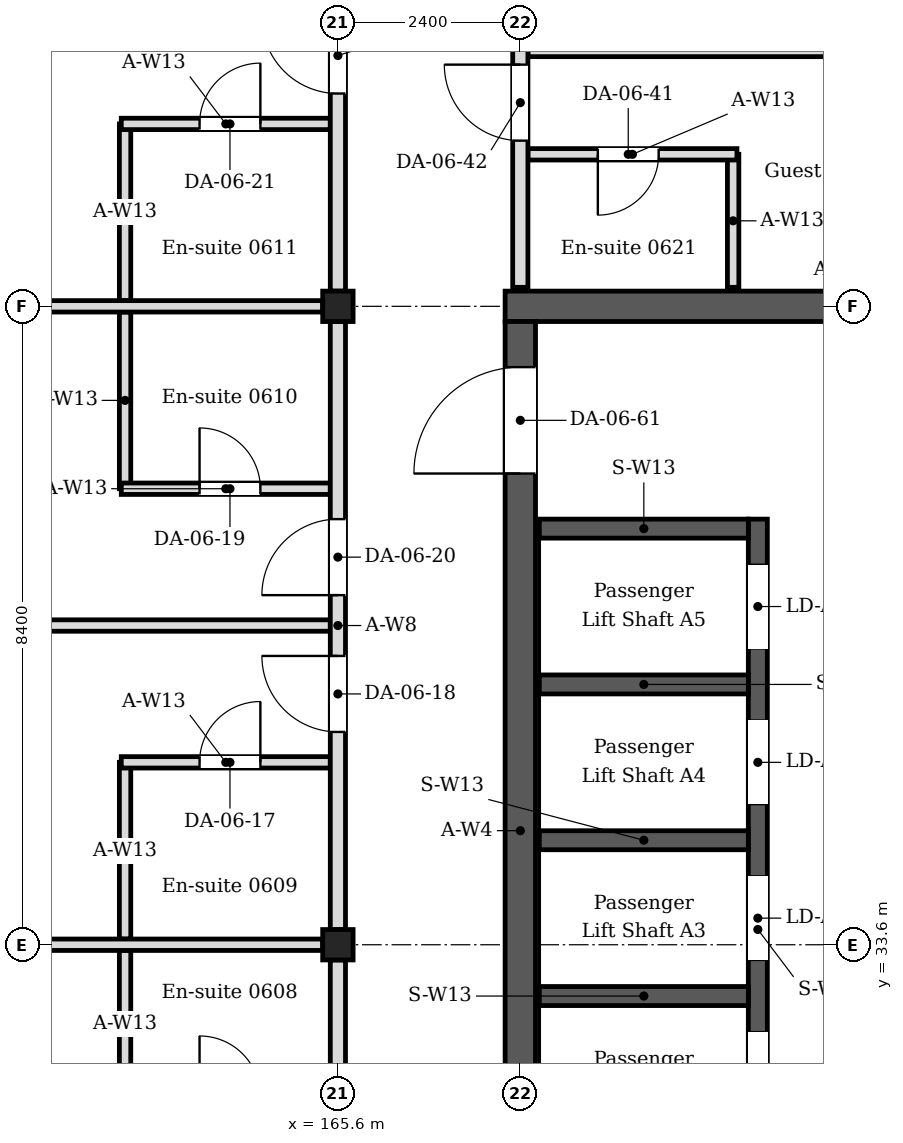
"""IFC4 building model, lengths in metres.
Left out: names, types, materials, properties, quantities, classifications, styles, units other than length and angle.
Written with IfcOpenShell. Run it as: python <this file> out.ifc"""

import sys

from ifc_helpers import new_model, si_unit, direction, frame, frame_2d, origin, origin_2d, place, context, subcontext, project, spatial, rectangle, i_section, extrude, element, fill, save


model = new_model("IFC4")
c1 = context("Model", 3, precision=1e-05, world=origin(), true_north=direction((0.0, 1.0)))
c2 = subcontext(c1, "Body", "Model", "MODEL_VIEW")
j1 = project(units=[si_unit("LENGTHUNIT", "METRE"), si_unit("PLANEANGLEUNIT", "RADIAN")], contexts=[c1])
p1 = place(None, origin())
s1 = spatial("IfcSite", under=j1, at=p1, CompositionType="ELEMENT")
p2 = place(p1, origin())
s2 = spatial("IfcBuilding", under=s1, at=p2, CompositionType="ELEMENT")
p3 = place(p2, frame((0.0, 0.0, 27.0)))
s3 = spatial("IfcBuildingStorey", under=s2, at=p3, CompositionType="ELEMENT", Elevation=27.0)
for number, where, z_axis, x_axis in (
    (1, (165.6, 33.6, 0.0), (0.0, 0.0, 1.0), (1.0, 0.0, 0.0)),
    (2, (165.6, 42.0, 0.0), (0.0, 0.0, 1.0), (1.0, 0.0, 0.0)),
):
    element("IfcColumn", number, at=place(p3, frame(where, z_axis=z_axis, x_axis=x_axis)), inside=s3, PredefinedType="COLUMN", context=c2, shape_type="SweptSolid", body=[
        extrude(i_section(OverallWidth=0.4, OverallDepth=0.4, WebThickness=0.013, FlangeThickness=0.021, FilletRadius=0.022, at=origin_2d()), origin(), (0.0, 0.0, 1.0), 4.2),
    ])
p4 = place(p3, frame((167.8, 42.0, 0.0), z_axis=(0.0, 0.0, 1.0), x_axis=(1.0, 0.0, 0.0)))
e3 = element("IfcWall", 3, at=p4, inside=s3, PredefinedType="SOLIDWALL", context=c2, shape_type="SweptSolid", body=[
    extrude(rectangle(XDim=8.8, YDim=0.4, at=frame_2d((4.4, 0.0))), origin(), (0.0, 0.0, 1.0), 4.05),
])
p5 = place(p3, frame((168.0, 25.4, 0.0), z_axis=(0.0, 0.0, 1.0), x_axis=(0.0, 1.0, 0.0)))
e4 = element("IfcWall", 4, at=p5, inside=s3, PredefinedType="SOLIDWALL", context=c2, shape_type="SweptSolid", body=[
    extrude(rectangle(XDim=16.4, YDim=0.4, at=frame_2d((8.2, 0.0))), origin(), (0.0, 0.0, 1.0), 4.05),
])
p6 = place(p5, frame((1.0, 0.0, 0.0)))
e5 = element("IfcOpeningElement", 5, at=p6, cuts=e4, PredefinedType="OPENING", context=c2, shape_type="SweptSolid", body=[
    extrude(rectangle(XDim=1.0, YDim=2.1, at=frame_2d((0.5, 1.05))), frame((0.0, 0.21, 0.0), z_axis=(0.0, -1.0, 0.0), x_axis=(1.0, 0.0, 0.0)), (0.0, 0.0, 1.0), 0.42),
])
p7 = place(p5, frame((14.4, 0.0, 0.0)))
e6 = element("IfcOpeningElement", 6, at=p7, cuts=e4, PredefinedType="OPENING", context=c2, shape_type="SweptSolid", body=[
    extrude(rectangle(XDim=1.4, YDim=2.1, at=frame_2d((0.7, 1.05))), frame((0.0, 0.21, 0.0), z_axis=(0.0, -1.0, 0.0), x_axis=(1.0, 0.0, 0.0)), (0.0, 0.0, 1.0), 0.42),
])
p8 = place(p3, frame((162.8, 31.6, 0.0), z_axis=(0.0, 0.0, 1.0), x_axis=(0.0, 1.0, 0.0)))
e7 = element("IfcWall", 7, at=p8, inside=s3, PredefinedType="PARTITIONING", context=c2, shape_type="SweptSolid", body=[
    extrude(rectangle(XDim=1.925, YDim=0.15, at=frame_2d((0.962, 0.0))), origin(), (0.0, 0.0, 1.0), 4.05),
])
p9 = place(p3, frame((162.8, 33.675, 0.0), z_axis=(0.0, 0.0, 1.0), x_axis=(0.0, 1.0, 0.0)))
e8 = element("IfcWall", 8, at=p9, inside=s3, PredefinedType="PARTITIONING", context=c2, shape_type="SweptSolid", body=[
    extrude(rectangle(XDim=2.325, YDim=0.15, at=frame_2d((1.163, 0.0))), origin(), (0.0, 0.0, 1.0), 4.05),
])
p10 = place(p3, frame((162.75, 36.0, 0.0), z_axis=(0.0, 0.0, 1.0), x_axis=(1.0, 0.0, 0.0)))
e9 = element("IfcWall", 9, at=p10, inside=s3, PredefinedType="PARTITIONING", context=c2, shape_type="SweptSolid", body=[
    extrude(rectangle(XDim=2.75, YDim=0.15, at=frame_2d((1.375, 0.0))), origin(), (0.0, 0.0, 1.0), 4.05),
])
p11 = place(p10, frame((1.03, 0.0, 0.0)))
e10 = element("IfcOpeningElement", 10, at=p11, cuts=e9, PredefinedType="OPENING", context=c2, shape_type="SweptSolid", body=[
    extrude(rectangle(XDim=0.8, YDim=2.1, at=frame_2d((0.4, 1.05))), frame((0.0, 0.085, 0.0), z_axis=(0.0, -1.0, 0.0), x_axis=(1.0, 0.0, 0.0)), (0.0, 0.0, 1.0), 0.17),
])
p12 = place(p3, frame((162.8, 39.6, 0.0), z_axis=(0.0, 0.0, 1.0), x_axis=(0.0, 1.0, 0.0)))
e11 = element("IfcWall", 11, at=p12, inside=s3, PredefinedType="PARTITIONING", context=c2, shape_type="SweptSolid", body=[
    extrude(rectangle(XDim=2.325, YDim=0.15, at=frame_2d((1.163, 0.0))), origin(), (0.0, 0.0, 1.0), 4.05),
])
p13 = place(p3, frame((162.75, 39.6, 0.0), z_axis=(0.0, 0.0, 1.0), x_axis=(1.0, 0.0, 0.0)))
e12 = element("IfcWall", 12, at=p13, inside=s3, PredefinedType="PARTITIONING", context=c2, shape_type="SweptSolid", body=[
    extrude(rectangle(XDim=2.75, YDim=0.15, at=frame_2d((1.375, 0.0))), origin(), (0.0, 0.0, 1.0), 4.05),
])
p14 = place(p13, frame((1.03, 0.0, 0.0)))
e13 = element("IfcOpeningElement", 13, at=p14, cuts=e12, PredefinedType="OPENING", context=c2, shape_type="SweptSolid", body=[
    extrude(rectangle(XDim=0.8, YDim=2.1, at=frame_2d((0.4, 1.05))), frame((0.0, 0.085, 0.0), z_axis=(0.0, -1.0, 0.0), x_axis=(1.0, 0.0, 0.0)), (0.0, 0.0, 1.0), 0.17),
])
p15 = place(p3, frame((162.8, 42.075, 0.0), z_axis=(0.0, 0.0, 1.0), x_axis=(0.0, 1.0, 0.0)))
e14 = element("IfcWall", 14, at=p15, inside=s3, PredefinedType="PARTITIONING", context=c2, shape_type="SweptSolid", body=[
    extrude(rectangle(XDim=2.325, YDim=0.15, at=frame_2d((1.163, 0.0))), origin(), (0.0, 0.0, 1.0), 4.05),
])
p16 = place(p3, frame((162.75, 44.4, 0.0), z_axis=(0.0, 0.0, 1.0), x_axis=(1.0, 0.0, 0.0)))
e15 = element("IfcWall", 15, at=p16, inside=s3, PredefinedType="PARTITIONING", context=c2, shape_type="SweptSolid", body=[
    extrude(rectangle(XDim=2.75, YDim=0.15, at=frame_2d((1.375, 0.0))), origin(), (0.0, 0.0, 1.0), 4.05),
])
p17 = place(p16, frame((1.03, 0.0, 0.0)))
e16 = element("IfcOpeningElement", 16, at=p17, cuts=e15, PredefinedType="OPENING", context=c2, shape_type="SweptSolid", body=[
    extrude(rectangle(XDim=0.8, YDim=2.1, at=frame_2d((0.4, 1.05))), frame((0.0, 0.085, 0.0), z_axis=(0.0, -1.0, 0.0), x_axis=(1.0, 0.0, 0.0)), (0.0, 0.0, 1.0), 0.17),
])
p18 = place(p3, frame((170.8, 42.25, 0.0), z_axis=(0.0, 0.0, 1.0), x_axis=(0.0, 1.0, 0.0)))
e17 = element("IfcWall", 17, at=p18, inside=s3, PredefinedType="PARTITIONING", context=c2, shape_type="SweptSolid", body=[
    extrude(rectangle(XDim=1.75, YDim=0.15, at=frame_2d((0.875, 0.0))), origin(), (0.0, 0.0, 1.0), 4.05),
])
p19 = place(p3, frame((170.85, 44.0, 0.0), z_axis=(0.0, 0.0, 1.0), x_axis=(-1.0, 0.0, 0.0)))
e18 = element("IfcWall", 18, at=p19, inside=s3, PredefinedType="PARTITIONING", context=c2, shape_type="SweptSolid", body=[
    extrude(rectangle(XDim=2.75, YDim=0.15, at=frame_2d((1.375, 0.0))), origin(), (0.0, 0.0, 1.0), 4.05),
])
p20 = place(p19, frame((1.03, 0.0, 0.0)))
e19 = element("IfcOpeningElement", 19, at=p20, cuts=e18, PredefinedType="OPENING", context=c2, shape_type="SweptSolid", body=[
    extrude(rectangle(XDim=0.8, YDim=2.1, at=frame_2d((0.4, 1.05))), frame((0.0, 0.085, 0.0), z_axis=(0.0, -1.0, 0.0), x_axis=(1.0, 0.0, 0.0)), (0.0, 0.0, 1.0), 0.17),
])
for number, where, z_axis, x_axis in (
    (20, (157.4, 33.6, 0.0), (0.0, 0.0, 1.0), (1.0, 0.0, 0.0)),
    (21, (157.4, 42.0, 0.0), (0.0, 0.0, 1.0), (1.0, 0.0, 0.0)),
):
    element("IfcWall", number, at=place(p3, frame(where, z_axis=z_axis, x_axis=x_axis)), inside=s3, PredefinedType="PARTITIONING", context=c2, shape_type="SweptSolid", body=[
        extrude(rectangle(XDim=8.0, YDim=0.15, at=frame_2d((4.0, 0.0))), origin(), (0.0, 0.0, 1.0), 3.604),
    ])
for number, where, z_axis, x_axis in (
    (22, (156.98, 37.8, 0.0), (0.0, 0.0, 1.0), (1.0, 0.0, 0.0)),
    (23, (168.1, 45.36, 0.0), (0.0, 0.0, 1.0), (1.0, 0.0, 0.0)),
):
    element("IfcWall", number, at=place(p3, frame(where, z_axis=z_axis, x_axis=x_axis)), inside=s3, PredefinedType="PARTITIONING", context=c2, shape_type="SweptSolid", body=[
        extrude(rectangle(XDim=8.52, YDim=0.15, at=frame_2d((4.26, 0.0))), origin(), (0.0, 0.0, 1.0), 3.604),
    ])
p21 = place(p3, frame((165.6, 25.4, 0.0), z_axis=(0.0, 0.0, 1.0), x_axis=(0.0, 1.0, 0.0)))
e24 = element("IfcWall", 24, at=p21, inside=s3, PredefinedType="PARTITIONING", context=c2, shape_type="SweptSolid", body=[
    extrude(rectangle(XDim=8.0, YDim=0.2, at=frame_2d((4.0, 0.0))), origin(), (0.0, 0.0, 1.0), 3.45),
])
p22 = place(p21, frame((3.02, 0.0, 0.0)))
e25 = element("IfcOpeningElement", 25, at=p22, cuts=e24, PredefinedType="OPENING", context=c2, shape_type="SweptSolid", body=[
    extrude(rectangle(XDim=1.0, YDim=2.4, at=frame_2d((0.5, 1.2))), frame((0.0, 0.11, 0.0), z_axis=(0.0, -1.0, 0.0), x_axis=(1.0, 0.0, 0.0)), (0.0, 0.0, 1.0), 0.22),
])
p23 = place(p21, frame((5.02, 0.0, 0.0)))
e26 = element("IfcOpeningElement", 26, at=p23, cuts=e24, PredefinedType="OPENING", context=c2, shape_type="SweptSolid", body=[
    extrude(rectangle(XDim=1.0, YDim=2.4, at=frame_2d((0.5, 1.2))), frame((0.0, 0.11, 0.0), z_axis=(0.0, -1.0, 0.0), x_axis=(1.0, 0.0, 0.0)), (0.0, 0.0, 1.0), 0.22),
])
p24 = place(p3, frame((165.6, 33.8, 0.0), z_axis=(0.0, 0.0, 1.0), x_axis=(0.0, 1.0, 0.0)))
e27 = element("IfcWall", 27, at=p24, inside=s3, PredefinedType="PARTITIONING", context=c2, shape_type="SweptSolid", body=[
    extrude(rectangle(XDim=8.0, YDim=0.2, at=frame_2d((4.0, 0.0))), origin(), (0.0, 0.0, 1.0), 3.45),
])
p25 = place(p24, frame((2.6, 0.0, 0.0)))
e28 = element("IfcOpeningElement", 28, at=p25, cuts=e27, PredefinedType="OPENING", context=c2, shape_type="SweptSolid", body=[
    extrude(rectangle(XDim=1.0, YDim=2.4, at=frame_2d((0.5, 1.2))), frame((0.0, 0.11, 0.0), z_axis=(0.0, -1.0, 0.0), x_axis=(1.0, 0.0, 0.0)), (0.0, 0.0, 1.0), 0.22),
])
p26 = place(p24, frame((4.4, 0.0, 0.0)))
e29 = element("IfcOpeningElement", 29, at=p26, cuts=e27, PredefinedType="OPENING", context=c2, shape_type="SweptSolid", body=[
    extrude(rectangle(XDim=1.0, YDim=2.4, at=frame_2d((0.5, 1.2))), frame((0.0, 0.11, 0.0), z_axis=(0.0, -1.0, 0.0), x_axis=(1.0, 0.0, 0.0)), (0.0, 0.0, 1.0), 0.22),
])
p27 = place(p3, frame((165.6, 42.2, 0.0), z_axis=(0.0, 0.0, 1.0), x_axis=(0.0, 1.0, 0.0)))
e30 = element("IfcWall", 30, at=p27, inside=s3, PredefinedType="PARTITIONING", context=c2, shape_type="SweptSolid", body=[
    extrude(rectangle(XDim=8.0, YDim=0.2, at=frame_2d((4.0, 0.0))), origin(), (0.0, 0.0, 1.0), 3.45),
])
p28 = place(p27, frame((2.6, 0.0, 0.0)))
e31 = element("IfcOpeningElement", 31, at=p28, cuts=e30, PredefinedType="OPENING", context=c2, shape_type="SweptSolid", body=[
    extrude(rectangle(XDim=1.0, YDim=2.4, at=frame_2d((0.5, 1.2))), frame((0.0, 0.11, 0.0), z_axis=(0.0, -1.0, 0.0), x_axis=(1.0, 0.0, 0.0)), (0.0, 0.0, 1.0), 0.22),
])
p29 = place(p27, frame((4.4, 0.0, 0.0)))
e32 = element("IfcOpeningElement", 32, at=p29, cuts=e30, PredefinedType="OPENING", context=c2, shape_type="SweptSolid", body=[
    extrude(rectangle(XDim=1.0, YDim=2.4, at=frame_2d((0.5, 1.2))), frame((0.0, 0.11, 0.0), z_axis=(0.0, -1.0, 0.0), x_axis=(1.0, 0.0, 0.0)), (0.0, 0.0, 1.0), 0.22),
])
p30 = place(p3, frame((168.0, 42.25, 0.0), z_axis=(0.0, 0.0, 1.0), x_axis=(0.0, 1.0, 0.0)))
e33 = element("IfcWall", 33, at=p30, inside=s3, PredefinedType="PARTITIONING", context=c2, shape_type="SweptSolid", body=[
    extrude(rectangle(XDim=7.95, YDim=0.2, at=frame_2d((3.975, 0.0))), origin(), (0.0, 0.0, 1.0), 3.45),
])
p31 = place(p30, frame((1.93, 0.0, 0.0)))
e34 = element("IfcOpeningElement", 34, at=p31, cuts=e33, PredefinedType="OPENING", context=c2, shape_type="SweptSolid", body=[
    extrude(rectangle(XDim=1.0, YDim=2.4, at=frame_2d((0.5, 1.2))), frame((0.0, 0.11, 0.0), z_axis=(0.0, -1.0, 0.0), x_axis=(1.0, 0.0, 0.0)), (0.0, 0.0, 1.0), 0.22),
])
p32 = place(p30, frame((3.93, 0.0, 0.0)))
e35 = element("IfcOpeningElement", 35, at=p32, cuts=e33, PredefinedType="OPENING", context=c2, shape_type="SweptSolid", body=[
    extrude(rectangle(XDim=1.0, YDim=2.4, at=frame_2d((0.5, 1.2))), frame((0.0, 0.11, 0.0), z_axis=(0.0, -1.0, 0.0), x_axis=(1.0, 0.0, 0.0)), (0.0, 0.0, 1.0), 0.22),
])
p33 = place(p3, frame((171.125, 28.3, 0.0), z_axis=(0.0, 0.0, 1.0), x_axis=(0.0, 1.0, 0.0)))
e36 = element("IfcWall", 36, at=p33, inside=s3, PredefinedType="SOLIDWALL", context=c2, shape_type="SweptSolid", body=[
    extrude(rectangle(XDim=10.9, YDim=0.25, at=frame_2d((5.45, 0.0))), origin(), (0.0, 0.0, 1.0), 4.05),
])
p34 = place(p33, frame((0.8, 0.0, 0.0)))
e37 = element("IfcOpeningElement", 37, at=p34, cuts=e36, PredefinedType="OPENING", context=c2, shape_type="SweptSolid", body=[
    extrude(rectangle(XDim=1.1, YDim=2.1, at=frame_2d((0.55, 1.05))), frame((0.0, 0.135, 0.0), z_axis=(0.0, -1.0, 0.0), x_axis=(1.0, 0.0, 0.0)), (0.0, 0.0, 1.0), 0.27),
])
p35 = place(p33, frame((3.05, 0.0, 0.0)))
e38 = element("IfcOpeningElement", 38, at=p35, cuts=e36, PredefinedType="OPENING", context=c2, shape_type="SweptSolid", body=[
    extrude(rectangle(XDim=1.1, YDim=2.1, at=frame_2d((0.55, 1.05))), frame((0.0, 0.135, 0.0), z_axis=(0.0, -1.0, 0.0), x_axis=(1.0, 0.0, 0.0)), (0.0, 0.0, 1.0), 0.27),
])
p36 = place(p33, frame((5.1, 0.0, 0.0)))
e39 = element("IfcOpeningElement", 39, at=p36, cuts=e36, PredefinedType="OPENING", context=c2, shape_type="SweptSolid", body=[
    extrude(rectangle(XDim=1.1, YDim=2.1, at=frame_2d((0.55, 1.05))), frame((0.0, 0.135, 0.0), z_axis=(0.0, -1.0, 0.0), x_axis=(1.0, 0.0, 0.0)), (0.0, 0.0, 1.0), 0.27),
])
p37 = place(p33, frame((7.15, 0.0, 0.0)))
e40 = element("IfcOpeningElement", 40, at=p37, cuts=e36, PredefinedType="OPENING", context=c2, shape_type="SweptSolid", body=[
    extrude(rectangle(XDim=1.1, YDim=2.1, at=frame_2d((0.55, 1.05))), frame((0.0, 0.135, 0.0), z_axis=(0.0, -1.0, 0.0), x_axis=(1.0, 0.0, 0.0)), (0.0, 0.0, 1.0), 0.27),
])
p38 = place(p33, frame((9.2, 0.0, 0.0)))
e41 = element("IfcOpeningElement", 41, at=p38, cuts=e36, PredefinedType="OPENING", context=c2, shape_type="SweptSolid", body=[
    extrude(rectangle(XDim=1.1, YDim=2.1, at=frame_2d((0.55, 1.05))), frame((0.0, 0.135, 0.0), z_axis=(0.0, -1.0, 0.0), x_axis=(1.0, 0.0, 0.0)), (0.0, 0.0, 1.0), 0.27),
])
for number, where, z_axis, x_axis in (
    (42, (168.25, 32.925, 0.0), (0.0, 0.0, 1.0), (1.0, 0.0, 0.0)),
    (43, (168.25, 34.975, 0.0), (0.0, 0.0, 1.0), (1.0, 0.0, 0.0)),
    (44, (168.25, 37.025, 0.0), (0.0, 0.0, 1.0), (1.0, 0.0, 0.0)),
    (45, (168.25, 39.075, 0.0), (0.0, 0.0, 1.0), (1.0, 0.0, 0.0)),
):
    element("IfcWall", number, at=place(p3, frame(where, z_axis=z_axis, x_axis=x_axis)), inside=s3, PredefinedType="SOLIDWALL", context=c2, shape_type="SweptSolid", body=[
        extrude(rectangle(XDim=2.75, YDim=0.25, at=frame_2d((1.375, 0.0))), origin(), (0.0, 0.0, 1.0), 4.05),
    ])
p39 = place(p11, origin())
e46 = element("IfcDoor", 46, at=p39, inside=s3, OperationType="SINGLE_SWING_RIGHT", PredefinedType="DOOR", context=c2, shape_type="SweptSolid", body=[
    extrude(rectangle(XDim=0.8, YDim=2.1, at=frame_2d((0.4, 1.05))), frame((0.0, 0.025, 0.0), z_axis=(0.0, -1.0, 0.0), x_axis=(1.0, 0.0, 0.0)), (0.0, 0.0, 1.0), 0.05),
])
fill(e10, e46)
p40 = place(p25, origin())
e47 = element("IfcDoor", 47, at=p40, inside=s3, OperationType="SINGLE_SWING_RIGHT", PredefinedType="DOOR", context=c2, shape_type="SweptSolid", body=[
    extrude(rectangle(XDim=1.0, YDim=2.4, at=frame_2d((0.5, 1.2))), frame((0.0, 0.025, 0.0), z_axis=(0.0, -1.0, 0.0), x_axis=(1.0, 0.0, 0.0)), (0.0, 0.0, 1.0), 0.05),
])
fill(e28, e47)
p41 = place(p14, origin())
e48 = element("IfcDoor", 48, at=p41, inside=s3, OperationType="SINGLE_SWING_LEFT", PredefinedType="DOOR", context=c2, shape_type="SweptSolid", body=[
    extrude(rectangle(XDim=0.8, YDim=2.1, at=frame_2d((0.4, 1.05))), frame((0.0, 0.025, 0.0), z_axis=(0.0, -1.0, 0.0), x_axis=(1.0, 0.0, 0.0)), (0.0, 0.0, 1.0), 0.05),
])
fill(e13, e48)
p42 = place(p26, origin())
e49 = element("IfcDoor", 49, at=p42, inside=s3, OperationType="SINGLE_SWING_LEFT", PredefinedType="DOOR", context=c2, shape_type="SweptSolid", body=[
    extrude(rectangle(XDim=1.0, YDim=2.4, at=frame_2d((0.5, 1.2))), frame((0.0, 0.025, 0.0), z_axis=(0.0, -1.0, 0.0), x_axis=(1.0, 0.0, 0.0)), (0.0, 0.0, 1.0), 0.05),
])
fill(e29, e49)
p43 = place(p17, origin())
e50 = element("IfcDoor", 50, at=p43, inside=s3, OperationType="SINGLE_SWING_RIGHT", PredefinedType="DOOR", context=c2, shape_type="SweptSolid", body=[
    extrude(rectangle(XDim=0.8, YDim=2.1, at=frame_2d((0.4, 1.05))), frame((0.0, 0.025, 0.0), z_axis=(0.0, -1.0, 0.0), x_axis=(1.0, 0.0, 0.0)), (0.0, 0.0, 1.0), 0.05),
])
fill(e16, e50)
p44 = place(p28, origin())
e51 = element("IfcDoor", 51, at=p44, inside=s3, OperationType="SINGLE_SWING_RIGHT", PredefinedType="DOOR", context=c2, shape_type="SweptSolid", body=[
    extrude(rectangle(XDim=1.0, YDim=2.4, at=frame_2d((0.5, 1.2))), frame((0.0, 0.025, 0.0), z_axis=(0.0, -1.0, 0.0), x_axis=(1.0, 0.0, 0.0)), (0.0, 0.0, 1.0), 0.05),
])
fill(e31, e51)
p45 = place(p20, origin())
e52 = element("IfcDoor", 52, at=p45, inside=s3, OperationType="SINGLE_SWING_RIGHT", PredefinedType="DOOR", context=c2, shape_type="SweptSolid", body=[
    extrude(rectangle(XDim=0.8, YDim=2.1, at=frame_2d((0.4, 1.05))), frame((0.0, 0.025, 0.0), z_axis=(0.0, -1.0, 0.0), x_axis=(1.0, 0.0, 0.0)), (0.0, 0.0, 1.0), 0.05),
])
fill(e19, e52)
p46 = place(p31, origin())
e53 = element("IfcDoor", 53, at=p46, inside=s3, OperationType="SINGLE_SWING_RIGHT", PredefinedType="DOOR", context=c2, shape_type="SweptSolid", body=[
    extrude(rectangle(XDim=1.0, YDim=2.4, at=frame_2d((0.5, 1.2))), frame((0.0, 0.025, 0.0), z_axis=(0.0, -1.0, 0.0), x_axis=(1.0, 0.0, 0.0)), (0.0, 0.0, 1.0), 0.05),
])
fill(e34, e53)
p47 = place(p35, origin())
e54 = element("IfcDoor", 54, at=p47, inside=s3, OperationType="SLIDING_TO_LEFT", PredefinedType="DOOR", context=c2, shape_type="SweptSolid", body=[
    extrude(rectangle(XDim=1.1, YDim=2.1, at=frame_2d((0.55, 1.05))), frame((0.0, 0.025, 0.0), z_axis=(0.0, -1.0, 0.0), x_axis=(1.0, 0.0, 0.0)), (0.0, 0.0, 1.0), 0.05),
])
fill(e38, e54)
p48 = place(p36, origin())
e55 = element("IfcDoor", 55, at=p48, inside=s3, OperationType="SLIDING_TO_LEFT", PredefinedType="DOOR", context=c2, shape_type="SweptSolid", body=[
    extrude(rectangle(XDim=1.1, YDim=2.1, at=frame_2d((0.55, 1.05))), frame((0.0, 0.025, 0.0), z_axis=(0.0, -1.0, 0.0), x_axis=(1.0, 0.0, 0.0)), (0.0, 0.0, 1.0), 0.05),
])
fill(e39, e55)
p49 = place(p37, origin())
e56 = element("IfcDoor", 56, at=p49, inside=s3, OperationType="SLIDING_TO_LEFT", PredefinedType="DOOR", context=c2, shape_type="SweptSolid", body=[
    extrude(rectangle(XDim=1.1, YDim=2.1, at=frame_2d((0.55, 1.05))), frame((0.0, 0.025, 0.0), z_axis=(0.0, -1.0, 0.0), x_axis=(1.0, 0.0, 0.0)), (0.0, 0.0, 1.0), 0.05),
])
fill(e40, e56)
p50 = place(p38, origin())
e57 = element("IfcDoor", 57, at=p50, inside=s3, OperationType="SLIDING_TO_LEFT", PredefinedType="DOOR", context=c2, shape_type="SweptSolid", body=[
    extrude(rectangle(XDim=1.1, YDim=2.1, at=frame_2d((0.55, 1.05))), frame((0.0, 0.025, 0.0), z_axis=(0.0, -1.0, 0.0), x_axis=(1.0, 0.0, 0.0)), (0.0, 0.0, 1.0), 0.05),
])
fill(e41, e57)
p51 = place(p7, origin())
e58 = element("IfcDoor", 58, at=p51, inside=s3, OperationType="DOUBLE_DOOR_DOUBLE_SWING", PredefinedType="DOOR", context=c2, shape_type="SweptSolid", body=[
    extrude(rectangle(XDim=1.4, YDim=2.1, at=frame_2d((0.7, 1.05))), frame((0.0, 0.025, 0.0), z_axis=(0.0, -1.0, 0.0), x_axis=(1.0, 0.0, 0.0)), (0.0, 0.0, 1.0), 0.05),
])
fill(e6, e58)
save(model, sys.argv[1])
